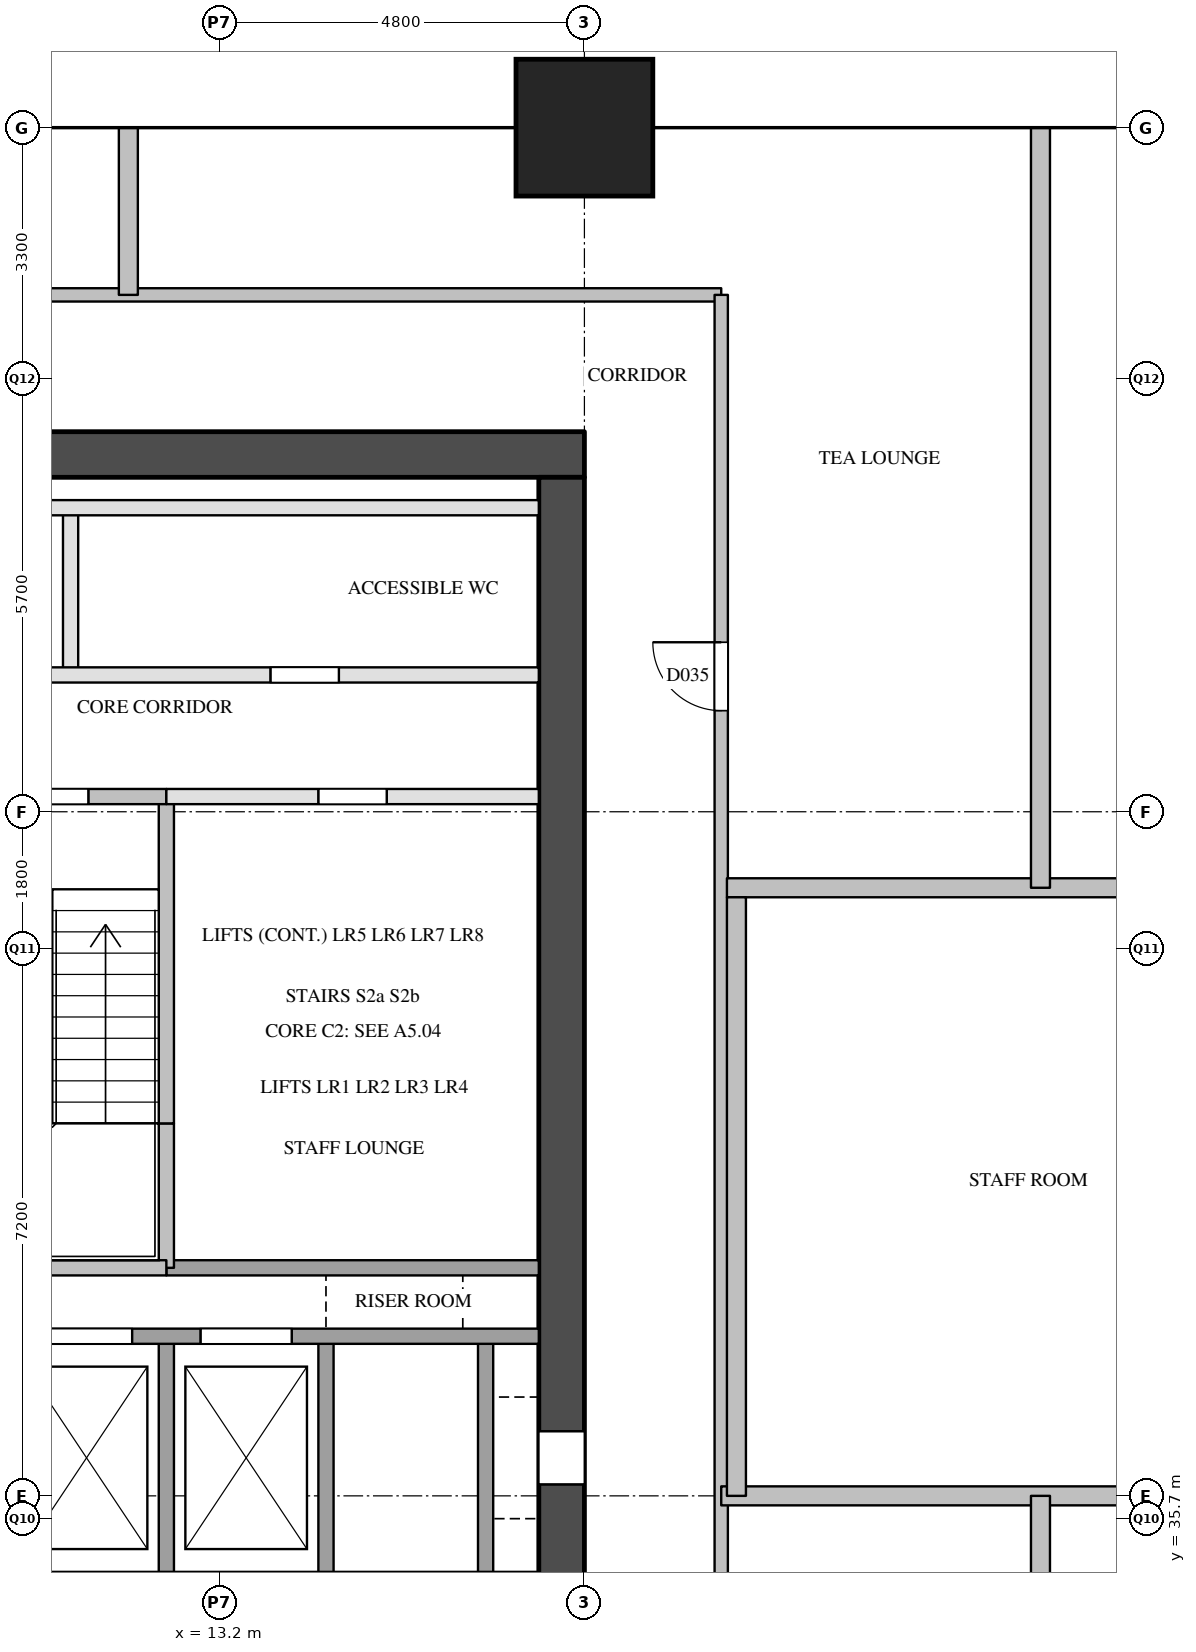
"""IFC4 building model, lengths in metres.
Left out: names, types, materials, properties, quantities, classifications, styles, units other than length and angle.
Written with IfcOpenShell. Run it as: python <this file> out.ifc"""

import sys

from ifc_helpers import new_model, si_unit, direction, frame, frame_2d, origin, origin_2d, place, context, subcontext, project, spatial, rectangle, extrude, element, fill, save


model = new_model("IFC4")
c1 = context("Model", 3, precision=1e-05, world=origin(), true_north=direction((0.0, 1.0)))
c2 = subcontext(c1, "Body", "Model", "MODEL_VIEW")
j1 = project(units=[si_unit("LENGTHUNIT", "METRE"), si_unit("PLANEANGLEUNIT", "RADIAN")], contexts=[c1])
p1 = place(None, origin())
s1 = spatial("IfcSite", under=j1, at=p1, CompositionType="ELEMENT")
p2 = place(p1, origin())
s2 = spatial("IfcBuilding", under=s1, at=p2, CompositionType="ELEMENT")
p3 = place(p2, frame((0.0, 0.0, 108.2)))
s3 = spatial("IfcBuildingStorey", under=s2, at=p3, CompositionType="ELEMENT", Elevation=108.2)
p4 = place(p3, frame((18.0, 54.0, 0.0), z_axis=(0.0, 0.0, 1.0), x_axis=(1.0, 0.0, 0.0)))
e1 = element("IfcColumn", 1, at=p4, inside=s3, PredefinedType="COLUMN", context=c2, shape_type="SweptSolid", body=[
    extrude(rectangle(XDim=1.8, YDim=1.8, at=origin_2d()), origin(), (0.0, 0.0, 1.0), 3.8),
])
p5 = place(p3, frame((5.6, 49.7, 0.0), z_axis=(0.0, 0.0, 1.0), x_axis=(1.0, 0.0, 0.0)))
e2 = element("IfcWall", 2, at=p5, inside=s3, PredefinedType="SHEAR", context=c2, shape_type="SweptSolid", body=[
    extrude(rectangle(XDim=12.4, YDim=0.6, at=frame_2d((6.2, 0.0))), origin(), (0.0, 0.0, 1.0), 3.5),
])
p6 = place(p3, frame((17.7, 29.1, 0.0), z_axis=(0.0, 0.0, 1.0), x_axis=(0.0, 1.0, 0.0)))
e3 = element("IfcWall", 3, at=p6, inside=s3, PredefinedType="SHEAR", context=c2, shape_type="SweptSolid", body=[
    extrude(rectangle(XDim=20.3, YDim=0.6, at=frame_2d((10.15, 0.0))), origin(), (0.0, 0.0, 1.0), 3.5),
])
p7 = place(p6, frame((1.25, 0.0, 0.0)))
e4 = element("IfcOpeningElement", 4, at=p7, cuts=e3, PredefinedType="OPENING", context=c2, shape_type="SweptSolid", body=[
    extrude(rectangle(XDim=0.7, YDim=2.1, at=frame_2d((0.35, 1.05))), frame((0.0, 0.31, 0.0), z_axis=(0.0, -1.0, 0.0), x_axis=(1.0, 0.0, 0.0)), (0.0, 0.0, 1.0), 0.62),
])
p8 = place(p6, frame((7.05, 0.0, 0.0)))
e5 = element("IfcOpeningElement", 5, at=p8, cuts=e3, PredefinedType="OPENING", context=c2, shape_type="SweptSolid", body=[
    extrude(rectangle(XDim=0.7, YDim=2.1, at=frame_2d((0.35, 1.05))), frame((0.0, 0.31, 0.0), z_axis=(0.0, -1.0, 0.0), x_axis=(1.0, 0.0, 0.0)), (0.0, 0.0, 1.0), 0.62),
])
p9 = place(p3, frame((11.24, 46.8, 0.0), z_axis=(0.0, 0.0, 1.0), x_axis=(0.0, 1.0, 0.0)))
e6 = element("IfcWall", 6, at=p9, inside=s3, PredefinedType="PARTITIONING", context=c2, shape_type="SweptSolid", body=[
    extrude(rectangle(XDim=2.2, YDim=0.2, at=frame_2d((1.1, 0.0))), origin(), (0.0, 0.0, 1.0), 3.5),
])
p10 = place(p3, frame((12.5, 34.9, 0.0), z_axis=(0.0, 0.0, 1.0), x_axis=(0.0, 1.0, 0.0)))
e7 = element("IfcWall", 7, at=p10, inside=s3, PredefinedType="SOLIDWALL", context=c2, shape_type="SweptSolid", body=[
    extrude(rectangle(XDim=3.2, YDim=0.2, at=frame_2d((1.6, 0.0))), origin(), (0.0, 0.0, 1.0), 3.5),
])
p11 = place(p3, frame((12.5, 39.0, 0.0), z_axis=(0.0, 0.0, 1.0), x_axis=(0.0, 1.0, 0.0)))
e8 = element("IfcWall", 8, at=p11, inside=s3, PredefinedType="SOLIDWALL", context=c2, shape_type="SweptSolid", body=[
    extrude(rectangle(XDim=1.9, YDim=0.2, at=frame_2d((0.95, 0.0))), origin(), (0.0, 0.0, 1.0), 3.5),
])
p12 = place(p3, frame((12.5, 40.9, 0.0), z_axis=(0.0, 0.0, 1.0), x_axis=(0.0, 1.0, 0.0)))
e9 = element("IfcWall", 9, at=p12, inside=s3, PredefinedType="SOLIDWALL", context=c2, shape_type="SweptSolid", body=[
    extrude(rectangle(XDim=4.3, YDim=0.2, at=frame_2d((2.15, 0.0))), origin(), (0.0, 0.0, 1.0), 3.5),
])
for number, where, z_axis, x_axis in (
    (10, (14.6, 34.9, 0.0), (0.0, 0.0, 1.0), (0.0, 1.0, 0.0)),
    (11, (16.7, 34.9, 0.0), (0.0, 0.0, 1.0), (0.0, 1.0, 0.0)),
):
    element("IfcWall", number, at=place(p3, frame(where, z_axis=z_axis, x_axis=x_axis)), inside=s3, PredefinedType="SOLIDWALL", context=c2, shape_type="SweptSolid", body=[
        extrude(rectangle(XDim=3.2, YDim=0.2, at=frame_2d((1.6, 0.0))), origin(), (0.0, 0.0, 1.0), 3.5),
    ])
p13 = place(p3, frame((6.2, 38.1, 0.0), z_axis=(0.0, 0.0, 1.0), x_axis=(1.0, 0.0, 0.0)))
e12 = element("IfcWall", 12, at=p13, inside=s3, PredefinedType="SOLIDWALL", context=c2, shape_type="SweptSolid", body=[
    extrude(rectangle(XDim=11.2, YDim=0.2, at=frame_2d((5.6, 0.0))), origin(), (0.0, 0.0, 1.0), 3.5),
])
p14 = place(p13, frame((0.45, 0.0, 0.0)))
e13 = element("IfcOpeningElement", 13, at=p14, cuts=e12, PredefinedType="OPENING", context=c2, shape_type="SweptSolid", body=[
    extrude(rectangle(XDim=1.2, YDim=2.1, at=frame_2d((0.6, 1.05))), frame((0.0, 0.11, 0.0), z_axis=(0.0, -1.0, 0.0), x_axis=(1.0, 0.0, 0.0)), (0.0, 0.0, 1.0), 0.22),
])
p15 = place(p13, frame((2.55, 0.0, 0.0)))
e14 = element("IfcOpeningElement", 14, at=p15, cuts=e12, PredefinedType="OPENING", context=c2, shape_type="SweptSolid", body=[
    extrude(rectangle(XDim=1.2, YDim=2.1, at=frame_2d((0.6, 1.05))), frame((0.0, 0.11, 0.0), z_axis=(0.0, -1.0, 0.0), x_axis=(1.0, 0.0, 0.0)), (0.0, 0.0, 1.0), 0.22),
])
p16 = place(p13, frame((4.65, 0.0, 0.0)))
e15 = element("IfcOpeningElement", 15, at=p16, cuts=e12, PredefinedType="OPENING", context=c2, shape_type="SweptSolid", body=[
    extrude(rectangle(XDim=1.2, YDim=2.1, at=frame_2d((0.6, 1.05))), frame((0.0, 0.11, 0.0), z_axis=(0.0, -1.0, 0.0), x_axis=(1.0, 0.0, 0.0)), (0.0, 0.0, 1.0), 0.22),
])
p17 = place(p13, frame((6.75, 0.0, 0.0)))
e16 = element("IfcOpeningElement", 16, at=p17, cuts=e12, PredefinedType="OPENING", context=c2, shape_type="SweptSolid", body=[
    extrude(rectangle(XDim=1.2, YDim=2.1, at=frame_2d((0.6, 1.05))), frame((0.0, 0.11, 0.0), z_axis=(0.0, -1.0, 0.0), x_axis=(1.0, 0.0, 0.0)), (0.0, 0.0, 1.0), 0.22),
])
p18 = place(p3, frame((12.5, 39.0, 0.0), z_axis=(0.0, 0.0, 1.0), x_axis=(1.0, 0.0, 0.0)))
e17 = element("IfcWall", 17, at=p18, inside=s3, PredefinedType="SOLIDWALL", context=c2, shape_type="SweptSolid", body=[
    extrude(rectangle(XDim=4.9, YDim=0.2, at=frame_2d((2.45, 0.0))), origin(), (0.0, 0.0, 1.0), 3.5),
])
p19 = place(p3, frame((9.45, 39.0, 0.0), z_axis=(0.0, 0.0, 1.0), x_axis=(1.0, 0.0, 0.0)))
e18 = element("IfcWall", 18, at=p19, inside=s3, PredefinedType="SOLIDWALL", context=c2, shape_type="SweptSolid", body=[
    extrude(rectangle(XDim=3.05, YDim=0.2, at=frame_2d((1.525, 0.0))), origin(), (0.0, 0.0, 1.0), 3.5),
])
p20 = place(p3, frame((12.5, 45.2, 0.0), z_axis=(0.0, 0.0, 1.0), x_axis=(1.0, 0.0, 0.0)))
e19 = element("IfcWall", 19, at=p20, inside=s3, PredefinedType="PARTITIONING", context=c2, shape_type="SweptSolid", body=[
    extrude(rectangle(XDim=4.9, YDim=0.2, at=frame_2d((2.45, 0.0))), origin(), (0.0, 0.0, 1.0), 3.5),
])
p21 = place(p20, frame((2.0, 0.0, 0.0)))
e20 = element("IfcOpeningElement", 20, at=p21, cuts=e19, PredefinedType="OPENING", context=c2, shape_type="SweptSolid", body=[
    extrude(rectangle(XDim=0.9, YDim=2.1, at=frame_2d((0.45, 1.05))), frame((0.0, 0.11, 0.0), z_axis=(0.0, -1.0, 0.0), x_axis=(1.0, 0.0, 0.0)), (0.0, 0.0, 1.0), 0.22),
])
p22 = place(p3, frame((6.2, 45.2, 0.0), z_axis=(0.0, 0.0, 1.0), x_axis=(1.0, 0.0, 0.0)))
e21 = element("IfcWall", 21, at=p22, inside=s3, PredefinedType="SOLIDWALL", context=c2, shape_type="SweptSolid", body=[
    extrude(rectangle(XDim=6.3, YDim=0.2, at=frame_2d((3.15, 0.0))), origin(), (0.0, 0.0, 1.0), 3.5),
])
p23 = place(p22, frame((1.025, 0.0, 0.0)))
e22 = element("IfcOpeningElement", 22, at=p23, cuts=e21, PredefinedType="OPENING", context=c2, shape_type="SweptSolid", body=[
    extrude(rectangle(XDim=1.1, YDim=2.1, at=frame_2d((0.55, 1.05))), frame((0.0, 0.11, 0.0), z_axis=(0.0, -1.0, 0.0), x_axis=(1.0, 0.0, 0.0)), (0.0, 0.0, 1.0), 0.22),
])
p24 = place(p22, frame((4.175, 0.0, 0.0)))
e23 = element("IfcOpeningElement", 23, at=p24, cuts=e21, PredefinedType="OPENING", context=c2, shape_type="SweptSolid", body=[
    extrude(rectangle(XDim=1.1, YDim=2.1, at=frame_2d((0.55, 1.05))), frame((0.0, 0.11, 0.0), z_axis=(0.0, -1.0, 0.0), x_axis=(1.0, 0.0, 0.0)), (0.0, 0.0, 1.0), 0.22),
])
p25 = place(p3, frame((6.2, 46.8, 0.0), z_axis=(0.0, 0.0, 1.0), x_axis=(1.0, 0.0, 0.0)))
e24 = element("IfcWall", 24, at=p25, inside=s3, PredefinedType="PARTITIONING", context=c2, shape_type="SweptSolid", body=[
    extrude(rectangle(XDim=11.2, YDim=0.2, at=frame_2d((5.6, 0.0))), origin(), (0.0, 0.0, 1.0), 3.5),
])
p26 = place(p25, frame((2.07, 0.0, 0.0)))
e25 = element("IfcOpeningElement", 25, at=p26, cuts=e24, PredefinedType="OPENING", context=c2, shape_type="SweptSolid", body=[
    extrude(rectangle(XDim=0.9, YDim=2.1, at=frame_2d((0.45, 1.05))), frame((0.0, 0.11, 0.0), z_axis=(0.0, -1.0, 0.0), x_axis=(1.0, 0.0, 0.0)), (0.0, 0.0, 1.0), 0.22),
])
p27 = place(p25, frame((7.67, 0.0, 0.0)))
e26 = element("IfcOpeningElement", 26, at=p27, cuts=e24, PredefinedType="OPENING", context=c2, shape_type="SweptSolid", body=[
    extrude(rectangle(XDim=0.9, YDim=2.1, at=frame_2d((0.45, 1.05))), frame((0.0, 0.11, 0.0), z_axis=(0.0, -1.0, 0.0), x_axis=(1.0, 0.0, 0.0)), (0.0, 0.0, 1.0), 0.22),
])
p28 = place(p3, frame((6.2, 49.0, 0.0), z_axis=(0.0, 0.0, 1.0), x_axis=(1.0, 0.0, 0.0)))
e27 = element("IfcWall", 27, at=p28, inside=s3, PredefinedType="PARTITIONING", context=c2, shape_type="SweptSolid", body=[
    extrude(rectangle(XDim=11.2, YDim=0.2, at=frame_2d((5.6, 0.0))), origin(), (0.0, 0.0, 1.0), 3.5),
])
p29 = place(p3, frame((3.8, 51.8, 0.0), z_axis=(0.0, 0.0, 1.0), x_axis=(1.0, 0.0, 0.0)))
e28 = element("IfcWall", 28, at=p29, inside=s3, PredefinedType="PARTITIONING", context=c2, shape_type="SweptSolid", body=[
    extrude(rectangle(XDim=16.0, YDim=0.175, at=frame_2d((8.0, 0.0))), origin(), (0.0, 0.0, 1.0), 3.5),
])
p30 = place(p29, frame((3.137, 0.0, 0.0)))
e29 = element("IfcOpeningElement", 29, at=p30, cuts=e28, PredefinedType="OPENING", context=c2, shape_type="SweptSolid", body=[
    extrude(rectangle(XDim=0.9, YDim=2.1, at=frame_2d((0.45, 1.05))), frame((0.0, 0.097, 0.0), z_axis=(0.0, -1.0, 0.0), x_axis=(1.0, 0.0, 0.0)), (0.0, 0.0, 1.0), 0.195),
])
p31 = place(p3, frame((19.8, 28.5, 0.0), z_axis=(0.0, 0.0, 1.0), x_axis=(0.0, 1.0, 0.0)))
e30 = element("IfcWall", 30, at=p31, inside=s3, PredefinedType="PARTITIONING", context=c2, shape_type="SweptSolid", body=[
    extrude(rectangle(XDim=23.3, YDim=0.175, at=frame_2d((11.65, 0.0))), origin(), (0.0, 0.0, 1.0), 3.5),
])
p32 = place(p31, frame((3.3, 0.0, 0.0)))
e31 = element("IfcOpeningElement", 31, at=p32, cuts=e30, PredefinedType="OPENING", context=c2, shape_type="SweptSolid", body=[
    extrude(rectangle(XDim=0.9, YDim=2.1, at=frame_2d((0.45, 1.05))), frame((0.0, 0.097, 0.0), z_axis=(0.0, -1.0, 0.0), x_axis=(1.0, 0.0, 0.0)), (0.0, 0.0, 1.0), 0.195),
])
p33 = place(p31, frame((17.83, 0.0, 0.0)))
e32 = element("IfcOpeningElement", 32, at=p33, cuts=e30, PredefinedType="OPENING", context=c2, shape_type="SweptSolid", body=[
    extrude(rectangle(XDim=0.9, YDim=2.1, at=frame_2d((0.45, 1.05))), frame((0.0, 0.097, 0.0), z_axis=(0.0, -1.0, 0.0), x_axis=(1.0, 0.0, 0.0)), (0.0, 0.0, 1.0), 0.195),
])
p34 = place(p3, frame((19.8, 36.0, 0.0), z_axis=(0.0, 0.0, 1.0), x_axis=(1.0, 0.0, 0.0)))
e33 = element("IfcWall", 33, at=p34, inside=s3, PredefinedType="PARTITIONING", context=c2, shape_type="SweptSolid", body=[
    extrude(rectangle(XDim=14.4, YDim=0.25, at=frame_2d((7.2, 0.0))), origin(), (0.0, 0.0, 1.0), 3.5),
])
p35 = place(p3, frame((19.875, 44.0, 0.0), z_axis=(0.0, 0.0, 1.0), x_axis=(1.0, 0.0, 0.0)))
e34 = element("IfcWall", 34, at=p35, inside=s3, PredefinedType="PARTITIONING", context=c2, shape_type="SweptSolid", body=[
    extrude(rectangle(XDim=14.325, YDim=0.25, at=frame_2d((7.163, 0.0))), origin(), (0.0, 0.0, 1.0), 2.5),
])
p36 = place(p3, frame((12.0, 51.8, 0.0), z_axis=(0.0, 0.0, 1.0), x_axis=(0.0, 1.0, 0.0)))
e35 = element("IfcWall", 35, at=p36, inside=s3, PredefinedType="PARTITIONING", context=c2, shape_type="SweptSolid", body=[
    extrude(rectangle(XDim=2.2, YDim=0.25, at=frame_2d((1.1, 0.0))), origin(), (0.0, 0.0, 1.0), 2.5),
])
p37 = place(p3, frame((20.0, 36.0, 0.0), z_axis=(0.0, 0.0, 1.0), x_axis=(0.0, 1.0, 0.0)))
e36 = element("IfcWall", 36, at=p37, inside=s3, PredefinedType="PARTITIONING", context=c2, shape_type="SweptSolid", body=[
    extrude(rectangle(XDim=7.875, YDim=0.25, at=frame_2d((3.938, 0.0))), origin(), (0.0, 0.0, 1.0), 3.5),
])
p38 = place(p3, frame((24.0, 27.0, 0.0), z_axis=(0.0, 0.0, 1.0), x_axis=(0.0, 1.0, 0.0)))
e37 = element("IfcWall", 37, at=p38, inside=s3, PredefinedType="PARTITIONING", context=c2, shape_type="SweptSolid", body=[
    extrude(rectangle(XDim=9.0, YDim=0.25, at=frame_2d((4.5, 0.0))), origin(), (0.0, 0.0, 1.0), 2.5),
])
p39 = place(p3, frame((24.0, 44.0, 0.0), z_axis=(0.0, 0.0, 1.0), x_axis=(0.0, 1.0, 0.0)))
e38 = element("IfcWall", 38, at=p39, inside=s3, PredefinedType="PARTITIONING", context=c2, shape_type="SweptSolid", body=[
    extrude(rectangle(XDim=10.0, YDim=0.25, at=frame_2d((5.0, 0.0))), origin(), (0.0, 0.0, 1.0), 2.5),
])
p40 = place(p16, origin())
e39 = element("IfcDoor", 39, at=p40, inside=s3, OperationType="SLIDING_TO_LEFT", PredefinedType="DOOR", context=c2, shape_type="SweptSolid", body=[
    extrude(rectangle(XDim=1.2, YDim=2.1, at=frame_2d((0.6, 1.05))), frame((0.0, 0.025, 0.0), z_axis=(0.0, -1.0, 0.0), x_axis=(1.0, 0.0, 0.0)), (0.0, 0.0, 1.0), 0.05),
])
fill(e15, e39)
p41 = place(p17, origin())
e40 = element("IfcDoor", 40, at=p41, inside=s3, OperationType="SLIDING_TO_LEFT", PredefinedType="DOOR", context=c2, shape_type="SweptSolid", body=[
    extrude(rectangle(XDim=1.2, YDim=2.1, at=frame_2d((0.6, 1.05))), frame((0.0, 0.025, 0.0), z_axis=(0.0, -1.0, 0.0), x_axis=(1.0, 0.0, 0.0)), (0.0, 0.0, 1.0), 0.05),
])
fill(e16, e40)
p42 = place(p8, origin())
e41 = element("IfcDoor", 41, at=p42, inside=s3, OperationType="SINGLE_SWING_LEFT", PredefinedType="DOOR", context=c2, shape_type="SweptSolid", body=[
    extrude(rectangle(XDim=0.7, YDim=2.1, at=frame_2d((0.35, 1.05))), frame((0.0, 0.025, 0.0), z_axis=(0.0, -1.0, 0.0), x_axis=(1.0, 0.0, 0.0)), (0.0, 0.0, 1.0), 0.05),
])
fill(e5, e41)
p43 = place(p24, origin())
e42 = element("IfcDoor", 42, at=p43, inside=s3, OperationType="SINGLE_SWING_RIGHT", PredefinedType="DOOR", context=c2, shape_type="SweptSolid", body=[
    extrude(rectangle(XDim=1.1, YDim=2.1, at=frame_2d((0.55, 1.05))), frame((0.0, 0.025, 0.0), z_axis=(0.0, -1.0, 0.0), x_axis=(1.0, 0.0, 0.0)), (0.0, 0.0, 1.0), 0.05),
])
fill(e23, e42)
p44 = place(p27, origin())
e43 = element("IfcDoor", 43, at=p44, inside=s3, OperationType="SINGLE_SWING_RIGHT", PredefinedType="DOOR", context=c2, shape_type="SweptSolid", body=[
    extrude(rectangle(XDim=0.9, YDim=2.1, at=frame_2d((0.45, 1.05))), frame((0.0, 0.025, 0.0), z_axis=(0.0, -1.0, 0.0), x_axis=(1.0, 0.0, 0.0)), (0.0, 0.0, 1.0), 0.05),
])
fill(e26, e43)
p45 = place(p21, origin())
e44 = element("IfcDoor", 44, at=p45, inside=s3, OperationType="SINGLE_SWING_RIGHT", PredefinedType="DOOR", context=c2, shape_type="SweptSolid", body=[
    extrude(rectangle(XDim=0.9, YDim=2.1, at=frame_2d((0.45, 1.05))), frame((0.0, 0.025, 0.0), z_axis=(0.0, -1.0, 0.0), x_axis=(1.0, 0.0, 0.0)), (0.0, 0.0, 1.0), 0.05),
])
fill(e20, e44)
p46 = place(p33, origin())
e45 = element("IfcDoor", 45, at=p46, inside=s3, OperationType="SINGLE_SWING_RIGHT", PredefinedType="DOOR", context=c2, shape_type="SweptSolid", body=[
    extrude(rectangle(XDim=0.9, YDim=2.1, at=frame_2d((0.45, 1.05))), frame((0.0, 0.025, 0.0), z_axis=(0.0, -1.0, 0.0), x_axis=(1.0, 0.0, 0.0)), (0.0, 0.0, 1.0), 0.05),
])
fill(e32, e45)
save(model, sys.argv[1])
